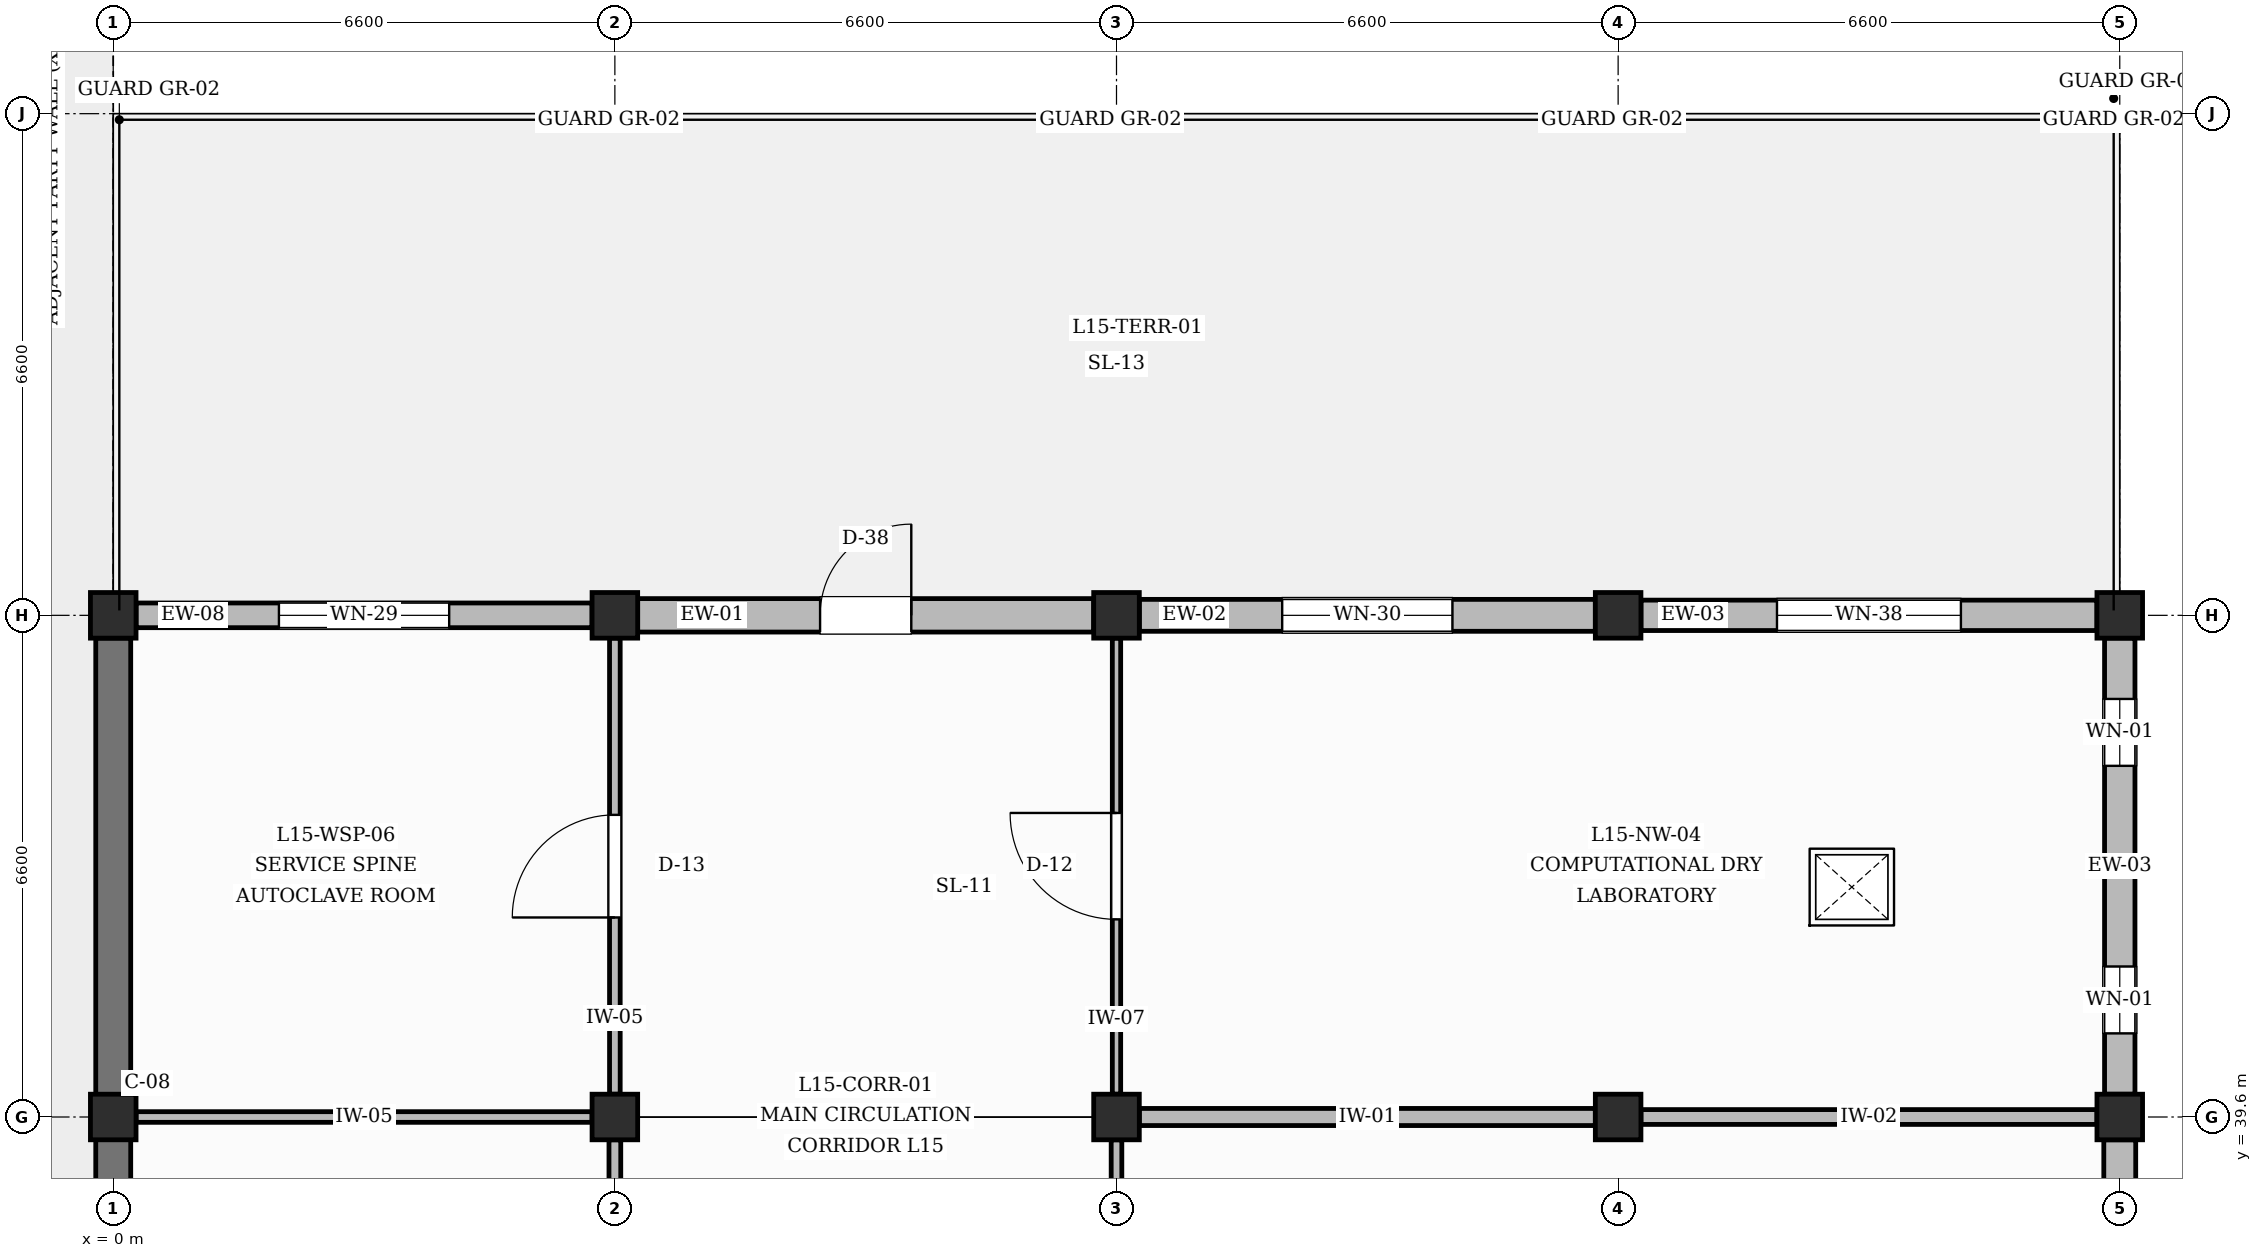
"""IFC4 building model, lengths in metres.
Left out: names, types, materials, properties, quantities, classifications, styles, units other than length and angle.
Written with IfcOpenShell. Run it as: python <this file> out.ifc"""

import sys

from ifc_helpers import new_model, si_unit, direction, frame, frame_2d, origin, origin_2d, place, context, subcontext, project, spatial, rectangle, extrude, element, fill, save


model = new_model("IFC4")
c1 = context("Model", 3, precision=1e-05, world=origin(), true_north=direction((0.0, 1.0)))
c2 = subcontext(c1, "Body", "Model", "MODEL_VIEW")
j1 = project(units=[si_unit("LENGTHUNIT", "METRE"), si_unit("PLANEANGLEUNIT", "RADIAN")], contexts=[c1])
p1 = place(None, origin())
s1 = spatial("IfcSite", under=j1, at=p1, CompositionType="ELEMENT")
p2 = place(p1, origin())
s2 = spatial("IfcBuilding", under=s1, at=p2, CompositionType="ELEMENT")
p3 = place(p2, frame((0.0, 0.0, 64.8)))
s3 = spatial("IfcBuildingStorey", under=s2, at=p3, CompositionType="ELEMENT", Elevation=64.8)
for number, where, z_axis, x_axis in (
    (1, (0.0, 39.6, 0.0), (0.0, 0.0, 1.0), (1.0, 0.0, 0.0)),
    (2, (0.0, 46.2, 0.0), (0.0, 0.0, 1.0), (1.0, 0.0, 0.0)),
    (3, (6.6, 39.6, 0.0), (0.0, 0.0, 1.0), (1.0, 0.0, 0.0)),
    (4, (6.6, 46.2, 0.0), (0.0, 0.0, 1.0), (1.0, 0.0, 0.0)),
    (5, (13.2, 39.6, 0.0), (0.0, 0.0, 1.0), (1.0, 0.0, 0.0)),
    (6, (13.2, 46.2, 0.0), (0.0, 0.0, 1.0), (1.0, 0.0, 0.0)),
    (7, (19.8, 39.6, 0.0), (0.0, 0.0, 1.0), (1.0, 0.0, 0.0)),
    (8, (19.8, 46.2, 0.0), (0.0, 0.0, 1.0), (1.0, 0.0, 0.0)),
    (9, (26.4, 39.6, 0.0), (0.0, 0.0, 1.0), (1.0, 0.0, 0.0)),
    (10, (26.4, 46.2, 0.0), (0.0, 0.0, 1.0), (1.0, 0.0, 0.0)),
):
    element("IfcColumn", number, at=place(p3, frame(where, z_axis=z_axis, x_axis=x_axis)), inside=s3, PredefinedType="COLUMN", context=c2, shape_type="SweptSolid", body=[
        extrude(rectangle(XDim=0.6, YDim=0.6, at=origin_2d()), origin(), (0.0, 0.0, 1.0), 4.2),
    ])
p4 = place(p3, frame((0.0, 33.3, 0.0), z_axis=(0.0, 0.0, 1.0), x_axis=(0.0, 1.0, 0.0)))
e11 = element("IfcWall", 11, at=p4, inside=s3, PredefinedType="SOLIDWALL", context=c2, shape_type="SweptSolid", body=[
    extrude(rectangle(XDim=6.0, YDim=0.46, at=frame_2d((3.0, 0.0))), origin(), (0.0, 0.0, 1.0), 3.3),
])
p5 = place(p3, frame((0.3, 46.2, 0.0), z_axis=(0.0, 0.0, 1.0), x_axis=(1.0, 0.0, 0.0)))
e12 = element("IfcWall", 12, at=p5, inside=s3, PredefinedType="SOLIDWALL", context=c2, shape_type="SweptSolid", body=[
    extrude(rectangle(XDim=6.0, YDim=0.325, at=frame_2d((3.0, 0.0))), origin(), (0.0, 0.0, 1.0), 3.3),
])
p6 = place(p5, frame((1.88, 0.0, 0.95)))
e13 = element("IfcOpeningElement", 13, at=p6, cuts=e12, PredefinedType="OPENING", context=c2, shape_type="SweptSolid", body=[
    extrude(rectangle(XDim=2.24, YDim=1.3, at=frame_2d((1.12, 0.65))), frame((0.0, 0.172, 0.0), z_axis=(0.0, -1.0, 0.0), x_axis=(1.0, 0.0, 0.0)), (0.0, 0.0, 1.0), 0.345),
])
p7 = place(p3, frame((0.0, 39.9, 0.0), z_axis=(0.0, 0.0, 1.0), x_axis=(0.0, 1.0, 0.0)))
e14 = element("IfcWall", 14, at=p7, inside=s3, PredefinedType="SOLIDWALL", context=c2, shape_type="SweptSolid", body=[
    extrude(rectangle(XDim=6.0, YDim=0.46, at=frame_2d((3.0, 0.0))), origin(), (0.0, 0.0, 1.0), 3.3),
])
p8 = place(p3, frame((6.9, 46.2, 0.0), z_axis=(0.0, 0.0, 1.0), x_axis=(1.0, 0.0, 0.0)))
e15 = element("IfcWall", 15, at=p8, inside=s3, PredefinedType="SOLIDWALL", context=c2, shape_type="SweptSolid", body=[
    extrude(rectangle(XDim=6.0, YDim=0.44, at=frame_2d((3.0, 0.0))), origin(), (0.0, 0.0, 1.0), 3.3),
])
p9 = place(p8, frame((2.4, 0.0, 0.0)))
e16 = element("IfcOpeningElement", 16, at=p9, cuts=e15, PredefinedType="OPENING", context=c2, shape_type="SweptSolid", body=[
    extrude(rectangle(XDim=1.2, YDim=2.15, at=frame_2d((0.6, 1.075))), frame((0.0, 0.23, 0.0), z_axis=(0.0, -1.0, 0.0), x_axis=(1.0, 0.0, 0.0)), (0.0, 0.0, 1.0), 0.46),
])
p10 = place(p3, frame((13.5, 46.2, 0.0), z_axis=(0.0, 0.0, 1.0), x_axis=(1.0, 0.0, 0.0)))
e17 = element("IfcWall", 17, at=p10, inside=s3, PredefinedType="SOLIDWALL", context=c2, shape_type="SweptSolid", body=[
    extrude(rectangle(XDim=6.0, YDim=0.42, at=frame_2d((3.0, 0.0))), origin(), (0.0, 0.0, 1.0), 3.3),
])
p11 = place(p10, frame((1.88, 0.0, 0.95)))
e18 = element("IfcOpeningElement", 18, at=p11, cuts=e17, PredefinedType="OPENING", context=c2, shape_type="SweptSolid", body=[
    extrude(rectangle(XDim=2.24, YDim=1.52, at=frame_2d((1.12, 0.76))), frame((0.0, 0.22, 0.0), z_axis=(0.0, -1.0, 0.0), x_axis=(1.0, 0.0, 0.0)), (0.0, 0.0, 1.0), 0.44),
])
p12 = place(p3, frame((26.4, 33.3, 0.0), z_axis=(0.0, 0.0, 1.0), x_axis=(0.0, 1.0, 0.0)))
e19 = element("IfcWall", 19, at=p12, inside=s3, PredefinedType="SOLIDWALL", context=c2, shape_type="SweptSolid", body=[
    extrude(rectangle(XDim=6.0, YDim=0.42, at=frame_2d((3.0, 0.0))), origin(), (0.0, 0.0, 1.0), 3.3),
])
p13 = place(p12, frame((1.88, 0.0, 0.95)))
e20 = element("IfcOpeningElement", 20, at=p13, cuts=e19, PredefinedType="OPENING", context=c2, shape_type="SweptSolid", body=[
    extrude(rectangle(XDim=2.24, YDim=1.96, at=frame_2d((1.12, 0.98))), frame((0.0, 0.22, 0.0), z_axis=(0.0, -1.0, 0.0), x_axis=(1.0, 0.0, 0.0)), (0.0, 0.0, 1.0), 0.44),
])
p14 = place(p3, frame((20.1, 46.2, 0.0), z_axis=(0.0, 0.0, 1.0), x_axis=(1.0, 0.0, 0.0)))
e21 = element("IfcWall", 21, at=p14, inside=s3, PredefinedType="SOLIDWALL", context=c2, shape_type="SweptSolid", body=[
    extrude(rectangle(XDim=6.0, YDim=0.4, at=frame_2d((3.0, 0.0))), origin(), (0.0, 0.0, 1.0), 3.3),
])
p15 = place(p14, frame((1.79, 0.0, 0.95)))
e22 = element("IfcOpeningElement", 22, at=p15, cuts=e21, PredefinedType="OPENING", context=c2, shape_type="SweptSolid", body=[
    extrude(rectangle(XDim=2.42, YDim=1.68, at=frame_2d((1.21, 0.84))), frame((0.0, 0.21, 0.0), z_axis=(0.0, -1.0, 0.0), x_axis=(1.0, 0.0, 0.0)), (0.0, 0.0, 1.0), 0.42),
])
p16 = place(p3, frame((26.4, 39.9, 0.0), z_axis=(0.0, 0.0, 1.0), x_axis=(0.0, 1.0, 0.0)))
e23 = element("IfcWall", 23, at=p16, inside=s3, PredefinedType="SOLIDWALL", context=c2, shape_type="SweptSolid", body=[
    extrude(rectangle(XDim=6.0, YDim=0.4, at=frame_2d((3.0, 0.0))), origin(), (0.0, 0.0, 1.0), 3.3),
])
p17 = place(p16, frame((0.8, 0.0, 0.95)))
e24 = element("IfcOpeningElement", 24, at=p17, cuts=e23, PredefinedType="OPENING", context=c2, shape_type="SweptSolid", body=[
    extrude(rectangle(XDim=0.88, YDim=1.3, at=frame_2d((0.44, 0.65))), frame((0.0, 0.21, 0.0), z_axis=(0.0, -1.0, 0.0), x_axis=(1.0, 0.0, 0.0)), (0.0, 0.0, 1.0), 0.42),
])
p18 = place(p16, frame((4.32, 0.0, 0.95)))
e25 = element("IfcOpeningElement", 25, at=p18, cuts=e23, PredefinedType="OPENING", context=c2, shape_type="SweptSolid", body=[
    extrude(rectangle(XDim=0.88, YDim=1.3, at=frame_2d((0.44, 0.65))), frame((0.0, 0.21, 0.0), z_axis=(0.0, -1.0, 0.0), x_axis=(1.0, 0.0, 0.0)), (0.0, 0.0, 1.0), 0.42),
])
p19 = place(p3, frame((6.6, 33.3, 0.0), z_axis=(0.0, 0.0, 1.0), x_axis=(0.0, 1.0, 0.0)))
e26 = element("IfcWall", 26, at=p19, inside=s3, PredefinedType="PARTITIONING", context=c2, shape_type="SweptSolid", body=[
    extrude(rectangle(XDim=6.0, YDim=0.155, at=frame_2d((3.0, 0.0))), origin(), (0.0, 0.0, 1.0), 3.3),
])
p20 = place(p19, frame((2.3, 0.0, 0.0)))
e27 = element("IfcOpeningElement", 27, at=p20, cuts=e26, PredefinedType="OPENING", context=c2, shape_type="SweptSolid", body=[
    extrude(rectangle(XDim=1.4, YDim=2.25, at=frame_2d((0.7, 1.125))), frame((0.0, 0.087, 0.0), z_axis=(0.0, -1.0, 0.0), x_axis=(1.0, 0.0, 0.0)), (0.0, 0.0, 1.0), 0.175),
])
p21 = place(p3, frame((0.3, 39.6, 0.0), z_axis=(0.0, 0.0, 1.0), x_axis=(1.0, 0.0, 0.0)))
e28 = element("IfcWall", 28, at=p21, inside=s3, PredefinedType="PARTITIONING", context=c2, shape_type="SweptSolid", body=[
    extrude(rectangle(XDim=6.0, YDim=0.14, at=frame_2d((3.0, 0.0))), origin(), (0.0, 0.0, 1.0), 3.3),
])
p22 = place(p3, frame((6.6, 39.9, 0.0), z_axis=(0.0, 0.0, 1.0), x_axis=(0.0, 1.0, 0.0)))
e29 = element("IfcWall", 29, at=p22, inside=s3, PredefinedType="PARTITIONING", context=c2, shape_type="SweptSolid", body=[
    extrude(rectangle(XDim=6.0, YDim=0.14, at=frame_2d((3.0, 0.0))), origin(), (0.0, 0.0, 1.0), 3.3),
])
p23 = place(p22, frame((2.325, 0.0, 0.0)))
e30 = element("IfcOpeningElement", 30, at=p23, cuts=e29, PredefinedType="OPENING", context=c2, shape_type="SweptSolid", body=[
    extrude(rectangle(XDim=1.35, YDim=2.3, at=frame_2d((0.675, 1.15))), frame((0.0, 0.08, 0.0), z_axis=(0.0, -1.0, 0.0), x_axis=(1.0, 0.0, 0.0)), (0.0, 0.0, 1.0), 0.16),
])
p24 = place(p3, frame((13.2, 33.3, 0.0), z_axis=(0.0, 0.0, 1.0), x_axis=(0.0, 1.0, 0.0)))
e31 = element("IfcWall", 31, at=p24, inside=s3, PredefinedType="PARTITIONING", context=c2, shape_type="SweptSolid", body=[
    extrude(rectangle(XDim=6.0, YDim=0.14, at=frame_2d((3.0, 0.0))), origin(), (0.0, 0.0, 1.0), 3.3),
])
p25 = place(p24, frame((2.275, 0.0, 0.0)))
e32 = element("IfcOpeningElement", 32, at=p25, cuts=e31, PredefinedType="OPENING", context=c2, shape_type="SweptSolid", body=[
    extrude(rectangle(XDim=1.45, YDim=2.25, at=frame_2d((0.725, 1.125))), frame((0.0, 0.08, 0.0), z_axis=(0.0, -1.0, 0.0), x_axis=(1.0, 0.0, 0.0)), (0.0, 0.0, 1.0), 0.16),
])
p26 = place(p3, frame((13.2, 39.9, 0.0), z_axis=(0.0, 0.0, 1.0), x_axis=(0.0, 1.0, 0.0)))
e33 = element("IfcWall", 33, at=p26, inside=s3, PredefinedType="PARTITIONING", context=c2, shape_type="SweptSolid", body=[
    extrude(rectangle(XDim=6.0, YDim=0.11, at=frame_2d((3.0, 0.0))), origin(), (0.0, 0.0, 1.0), 3.3),
])
p27 = place(p26, frame((2.3, 0.0, 0.0)))
e34 = element("IfcOpeningElement", 34, at=p27, cuts=e33, PredefinedType="OPENING", context=c2, shape_type="SweptSolid", body=[
    extrude(rectangle(XDim=1.4, YDim=2.25, at=frame_2d((0.7, 1.125))), frame((0.0, 0.065, 0.0), z_axis=(0.0, -1.0, 0.0), x_axis=(1.0, 0.0, 0.0)), (0.0, 0.0, 1.0), 0.13),
])
p28 = place(p3, frame((13.5, 39.6, 0.0), z_axis=(0.0, 0.0, 1.0), x_axis=(1.0, 0.0, 0.0)))
e35 = element("IfcWall", 35, at=p28, inside=s3, PredefinedType="PARTITIONING", context=c2, shape_type="SweptSolid", body=[
    extrude(rectangle(XDim=6.0, YDim=0.225, at=frame_2d((3.0, 0.0))), origin(), (0.0, 0.0, 1.0), 3.3),
])
p29 = place(p3, frame((20.1, 39.6, 0.0), z_axis=(0.0, 0.0, 1.0), x_axis=(1.0, 0.0, 0.0)))
e36 = element("IfcWall", 36, at=p29, inside=s3, PredefinedType="PARTITIONING", context=c2, shape_type="SweptSolid", body=[
    extrude(rectangle(XDim=6.0, YDim=0.195, at=frame_2d((3.0, 0.0))), origin(), (0.0, 0.0, 1.0), 3.3),
])
p30 = place(p6, origin())
e37 = element("IfcWindow", 37, at=p30, inside=s3, PartitioningType="DOUBLE_PANEL_VERTICAL", PredefinedType="WINDOW", context=c2, shape_type="SweptSolid", body=[
    extrude(rectangle(XDim=2.24, YDim=1.3, at=frame_2d((1.12, 0.65))), frame((0.0, 0.03, 0.0), z_axis=(0.0, -1.0, 0.0), x_axis=(1.0, 0.0, 0.0)), (0.0, 0.0, 1.0), 0.06),
])
fill(e13, e37)
p31 = place(p9, origin())
e38 = element("IfcDoor", 38, at=p31, inside=s3, OperationType="SINGLE_SWING_RIGHT", PredefinedType="DOOR", context=c2, shape_type="SweptSolid", body=[
    extrude(rectangle(XDim=1.2, YDim=2.15, at=frame_2d((0.6, 1.075))), frame((0.0, 0.025, 0.0), z_axis=(0.0, -1.0, 0.0), x_axis=(1.0, 0.0, 0.0)), (0.0, 0.0, 1.0), 0.05),
])
fill(e16, e38)
p32 = place(p11, origin())
e39 = element("IfcWindow", 39, at=p32, inside=s3, PartitioningType="DOUBLE_PANEL_VERTICAL", PredefinedType="WINDOW", context=c2, shape_type="SweptSolid", body=[
    extrude(rectangle(XDim=2.24, YDim=1.52, at=frame_2d((1.12, 0.76))), frame((0.0, 0.03, 0.0), z_axis=(0.0, -1.0, 0.0), x_axis=(1.0, 0.0, 0.0)), (0.0, 0.0, 1.0), 0.06),
])
fill(e18, e39)
p33 = place(p15, origin())
e40 = element("IfcWindow", 40, at=p33, inside=s3, PartitioningType="DOUBLE_PANEL_VERTICAL", PredefinedType="WINDOW", context=c2, shape_type="SweptSolid", body=[
    extrude(rectangle(XDim=2.42, YDim=1.68, at=frame_2d((1.21, 0.84))), frame((0.0, 0.03, 0.0), z_axis=(0.0, -1.0, 0.0), x_axis=(1.0, 0.0, 0.0)), (0.0, 0.0, 1.0), 0.06),
])
fill(e22, e40)
p34 = place(p17, origin())
e41 = element("IfcWindow", 41, at=p34, inside=s3, PartitioningType="SINGLE_PANEL", PredefinedType="WINDOW", context=c2, shape_type="SweptSolid", body=[
    extrude(rectangle(XDim=0.88, YDim=1.3, at=frame_2d((0.44, 0.65))), frame((0.0, 0.03, 0.0), z_axis=(0.0, -1.0, 0.0), x_axis=(1.0, 0.0, 0.0)), (0.0, 0.0, 1.0), 0.06),
])
fill(e24, e41)
p35 = place(p18, origin())
e42 = element("IfcWindow", 42, at=p35, inside=s3, PartitioningType="SINGLE_PANEL", PredefinedType="WINDOW", context=c2, shape_type="SweptSolid", body=[
    extrude(rectangle(XDim=0.88, YDim=1.3, at=frame_2d((0.44, 0.65))), frame((0.0, 0.03, 0.0), z_axis=(0.0, -1.0, 0.0), x_axis=(1.0, 0.0, 0.0)), (0.0, 0.0, 1.0), 0.06),
])
fill(e25, e42)
p36 = place(p23, origin())
e43 = element("IfcDoor", 43, at=p36, inside=s3, OperationType="SINGLE_SWING_LEFT", PredefinedType="DOOR", context=c2, shape_type="SweptSolid", body=[
    extrude(rectangle(XDim=1.35, YDim=2.3, at=frame_2d((0.675, 1.15))), frame((0.0, 0.025, 0.0), z_axis=(0.0, -1.0, 0.0), x_axis=(1.0, 0.0, 0.0)), (0.0, 0.0, 1.0), 0.05),
])
fill(e30, e43)
p37 = place(p27, origin())
e44 = element("IfcDoor", 44, at=p37, inside=s3, OperationType="SINGLE_SWING_RIGHT", PredefinedType="DOOR", context=c2, shape_type="SweptSolid", body=[
    extrude(rectangle(XDim=1.4, YDim=2.25, at=frame_2d((0.7, 1.125))), frame((0.0, 0.025, 0.0), z_axis=(0.0, -1.0, 0.0), x_axis=(1.0, 0.0, 0.0)), (0.0, 0.0, 1.0), 0.05),
])
fill(e34, e44)
save(model, sys.argv[1])
